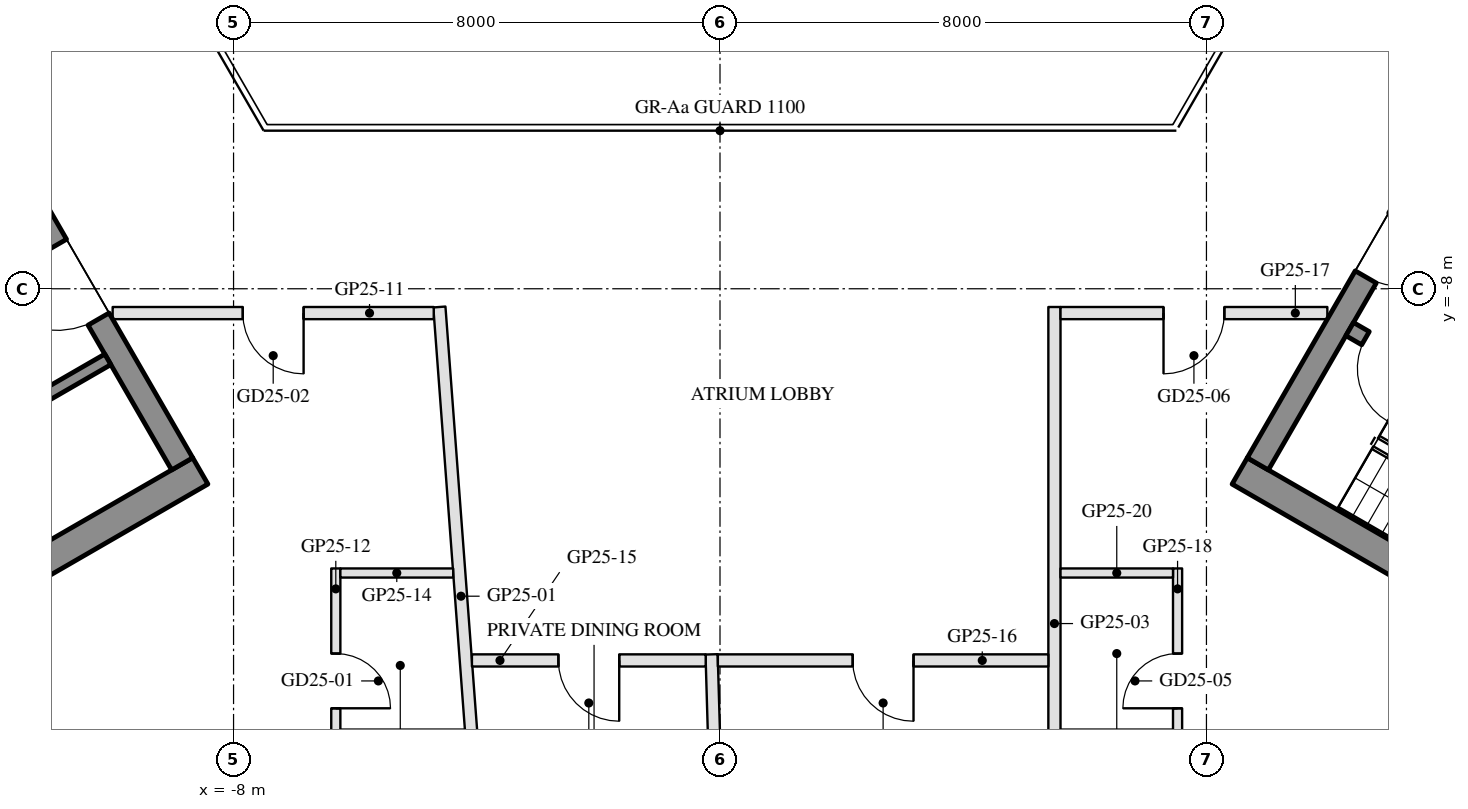
"""IFC4 building model, lengths in metres.
Left out: names, types, materials, properties, quantities, classifications, styles, units other than length and angle.
Written with IfcOpenShell. Run it as: python <this file> out.ifc"""

import sys

from ifc_helpers import new_model, si_unit, direction, frame, frame_2d, origin, place, context, subcontext, project, spatial, rectangle, extrude, element, fill, save


model = new_model("IFC4")
c1 = context("Model", 3, precision=1e-05, world=origin(), true_north=direction((0.0, 1.0)))
c2 = subcontext(c1, "Body", "Model", "MODEL_VIEW")
j1 = project(units=[si_unit("LENGTHUNIT", "METRE"), si_unit("PLANEANGLEUNIT", "RADIAN")], contexts=[c1])
p1 = place(None, origin())
s1 = spatial("IfcSite", under=j1, at=p1, CompositionType="ELEMENT")
p2 = place(p1, origin())
s2 = spatial("IfcBuilding", under=s1, at=p2, CompositionType="ELEMENT")
p3 = place(p2, frame((0.0, 0.0, 261.5)))
s3 = spatial("IfcBuildingStorey", under=s2, at=p3, CompositionType="ELEMENT", Elevation=261.5)
p4 = place(p3, frame((-8.547, -10.997, 0.0), z_axis=(0.0, 0.0, 1.0), x_axis=(-0.86602744543, -0.49999646375, 0.0)))
e1 = element("IfcWall", 1, at=p4, inside=s3, PredefinedType="SHEAR", context=c2, shape_type="SweptSolid", body=[
    extrude(rectangle(XDim=13.934, YDim=0.5, at=frame_2d((6.967, 0.0))), origin(), (0.0, 0.0, 1.0), 3.5),
])
p5 = place(p3, frame((-13.845, -2.22, 0.0), z_axis=(0.0, 0.0, 1.0), x_axis=(0.500004234368, -0.866022959057, 0.0)))
e2 = element("IfcWall", 2, at=p5, inside=s3, PredefinedType="SHEAR", context=c2, shape_type="SweptSolid", body=[
    extrude(rectangle(XDim=10.0, YDim=0.4, at=frame_2d((5.0, 0.0))), origin(), (0.0, 0.0, 1.0), 3.5),
])
p6 = place(p5, frame((3.55, 0.0, 0.0)))
e3 = element("IfcOpeningElement", 3, at=p6, cuts=e2, PredefinedType="OPENING", context=c2, shape_type="SweptSolid", body=[
    extrude(rectangle(XDim=1.1, YDim=2.1, at=frame_2d((0.55, 1.05))), frame((0.0, 0.21, 0.0), z_axis=(0.0, -1.0, 0.0), x_axis=(1.0, 0.0, 0.0)), (0.0, 0.0, 1.0), 0.42),
])
p7 = place(p5, frame((5.85, 0.0, 0.0)))
e4 = element("IfcOpeningElement", 4, at=p7, cuts=e2, PredefinedType="OPENING", context=c2, shape_type="SweptSolid", body=[
    extrude(rectangle(XDim=1.4, YDim=2.1, at=frame_2d((0.7, 1.05))), frame((0.0, 0.21, 0.0), z_axis=(0.0, -1.0, 0.0), x_axis=(1.0, 0.0, 0.0)), (0.0, 0.0, 1.0), 0.42),
])
p8 = place(p3, frame((-10.068, -9.162, 0.0), z_axis=(0.0, 0.0, 1.0), x_axis=(-0.866032725843, -0.499987317609, 0.0)))
e5 = element("IfcWall", 5, at=p8, inside=s3, PredefinedType="SHEAR", context=c2, shape_type="SweptSolid", body=[
    extrude(rectangle(XDim=10.16, YDim=0.2, at=frame_2d((5.08, 0.0))), origin(), (0.0, 0.0, 1.0), 3.5),
])
p9 = place(p8, frame((4.53, 0.0, 0.0)))
e6 = element("IfcOpeningElement", 6, at=p9, cuts=e5, PredefinedType="OPENING", context=c2, shape_type="SweptSolid", body=[
    extrude(rectangle(XDim=0.9, YDim=2.1, at=frame_2d((0.45, 1.05))), frame((0.0, 0.11, 0.0), z_axis=(0.0, -1.0, 0.0), x_axis=(1.0, 0.0, 0.0)), (0.0, 0.0, 1.0), 0.22),
])
p10 = place(p3, frame((8.547, -10.997, 0.0), z_axis=(0.0, 0.0, 1.0), x_axis=(0.86602744543, -0.49999646375, 0.0)))
e7 = element("IfcWall", 7, at=p10, inside=s3, PredefinedType="SHEAR", context=c2, shape_type="SweptSolid", body=[
    extrude(rectangle(XDim=13.934, YDim=0.5, at=frame_2d((6.967, 0.0))), origin(), (0.0, 0.0, 1.0), 3.5),
])
p11 = place(p3, frame((8.845, -10.88, 0.0), z_axis=(0.0, 0.0, 1.0), x_axis=(0.500004234368, 0.866022959057, 0.0)))
e8 = element("IfcWall", 8, at=p11, inside=s3, PredefinedType="SHEAR", context=c2, shape_type="SweptSolid", body=[
    extrude(rectangle(XDim=10.0, YDim=0.4, at=frame_2d((5.0, 0.0))), origin(), (0.0, 0.0, 1.0), 3.5),
])
p12 = place(p11, frame((3.55, 0.0, 0.0)))
e9 = element("IfcOpeningElement", 9, at=p12, cuts=e8, PredefinedType="OPENING", context=c2, shape_type="SweptSolid", body=[
    extrude(rectangle(XDim=1.1, YDim=2.1, at=frame_2d((0.55, 1.05))), frame((0.0, 0.21, 0.0), z_axis=(0.0, -1.0, 0.0), x_axis=(1.0, 0.0, 0.0)), (0.0, 0.0, 1.0), 0.42),
])
p13 = place(p11, frame((5.85, 0.0, 0.0)))
e10 = element("IfcOpeningElement", 10, at=p13, cuts=e8, PredefinedType="OPENING", context=c2, shape_type="SweptSolid", body=[
    extrude(rectangle(XDim=1.4, YDim=2.1, at=frame_2d((0.7, 1.05))), frame((0.0, 0.21, 0.0), z_axis=(0.0, -1.0, 0.0), x_axis=(1.0, 0.0, 0.0)), (0.0, 0.0, 1.0), 0.42),
])
p14 = place(p3, frame((10.356, -8.664, 0.0), z_axis=(0.0, 0.0, 1.0), x_axis=(0.866028629588, -0.499994412703, 0.0)))
e11 = element("IfcWall", 11, at=p14, inside=s3, PredefinedType="SHEAR", context=c2, shape_type="SweptSolid", body=[
    extrude(rectangle(XDim=6.45, YDim=0.25, at=frame_2d((3.225, 0.0))), origin(), (0.0, 0.0, 1.0), 3.5),
])
p15 = place(p14, frame((0.3, 0.0, 0.0)))
e12 = element("IfcOpeningElement", 12, at=p15, cuts=e11, PredefinedType="OPENING", context=c2, shape_type="SweptSolid", body=[
    extrude(rectangle(XDim=1.0, YDim=2.1, at=frame_2d((0.5, 1.05))), frame((0.0, 0.135, 0.0), z_axis=(0.0, -1.0, 0.0), x_axis=(1.0, 0.0, 0.0)), (0.0, 0.0, 1.0), 0.27),
])
p16 = place(p3, frame((-3.903, -17.813, 0.0), z_axis=(0.0, 0.0, 1.0), x_axis=(-0.074602257677, 0.997213368918, 0.0)))
e13 = element("IfcWall", 13, at=p16, inside=s3, PredefinedType="PARTITIONING", context=c2, shape_type="SweptSolid", body=[
    extrude(rectangle(XDim=9.54, YDim=0.2, at=frame_2d((4.77, 0.0))), origin(), (0.0, 0.0, 1.0), 3.0),
])
p17 = place(p3, frame((-0.04, -17.338, 0.0), z_axis=(0.0, 0.0, 1.0), x_axis=(-0.029431403757, 0.999566802406, 0.0)))
e14 = element("IfcWall", 14, at=p17, inside=s3, PredefinedType="PARTITIONING", context=c2, shape_type="SweptSolid", body=[
    extrude(rectangle(XDim=3.326, YDim=0.2, at=frame_2d((1.663, 0.0))), origin(), (0.0, 0.0, 1.0), 3.0),
])
p18 = place(p3, frame((5.5, -18.713, 0.0), z_axis=(0.0, 0.0, 1.0), x_axis=(0.0, 1.0, 0.0)))
e15 = element("IfcWall", 15, at=p18, inside=s3, PredefinedType="PARTITIONING", context=c2, shape_type="SweptSolid", body=[
    extrude(rectangle(XDim=10.413, YDim=0.2, at=frame_2d((5.207, 0.0))), origin(), (0.0, 0.0, 1.0), 3.1),
])
p19 = place(p3, frame((-4.708, -8.4, 0.0), z_axis=(0.0, 0.0, 1.0), x_axis=(-1.0, 0.0, 0.0)))
e16 = element("IfcWall", 16, at=p19, inside=s3, PredefinedType="PARTITIONING", context=c2, shape_type="SweptSolid", body=[
    extrude(rectangle(XDim=5.281, YDim=0.2, at=frame_2d((2.64, 0.0))), origin(), (0.0, 0.0, 1.0), 3.0),
])
p20 = place(p19, frame((2.14, 0.0, 0.0)))
e17 = element("IfcOpeningElement", 17, at=p20, cuts=e16, PredefinedType="OPENING", context=c2, shape_type="SweptSolid", body=[
    extrude(rectangle(XDim=1.0, YDim=2.1, at=frame_2d((0.5, 1.05))), frame((0.0, 0.11, 0.0), z_axis=(0.0, -1.0, 0.0), x_axis=(1.0, 0.0, 0.0)), (0.0, 0.0, 1.0), 0.22),
])
p21 = place(p3, frame((-6.319, -12.6, 0.0), z_axis=(0.0, 0.0, 1.0), x_axis=(0.0, -1.0, 0.0)))
e18 = element("IfcWall", 18, at=p21, inside=s3, PredefinedType="PARTITIONING", context=c2, shape_type="SweptSolid", body=[
    extrude(rectangle(XDim=2.8, YDim=0.15, at=frame_2d((1.4, 0.0))), origin(), (0.0, 0.0, 1.0), 3.55),
])
p22 = place(p21, frame((1.4, 0.0, 0.0)))
e19 = element("IfcOpeningElement", 19, at=p22, cuts=e18, PredefinedType="OPENING", context=c2, shape_type="SweptSolid", body=[
    extrude(rectangle(XDim=0.9, YDim=2.1, at=frame_2d((0.45, 1.05))), frame((0.0, 0.085, 0.0), z_axis=(0.0, -1.0, 0.0), x_axis=(1.0, 0.0, 0.0)), (0.0, 0.0, 1.0), 0.17),
])
p23 = place(p3, frame((-6.243, -12.675, 0.0), z_axis=(0.0, 0.0, 1.0), x_axis=(1.0, 0.0, 0.0)))
e20 = element("IfcWall", 20, at=p23, inside=s3, PredefinedType="PARTITIONING", context=c2, shape_type="SweptSolid", body=[
    extrude(rectangle(XDim=1.855, YDim=0.15, at=frame_2d((0.928, 0.0))), origin(), (0.0, 0.0, 1.0), 3.55),
])
p24 = place(p3, frame((-0.235, -14.113, 0.0), z_axis=(0.0, 0.0, 1.0), x_axis=(-1.0, 0.0, 0.0)))
e21 = element("IfcWall", 21, at=p24, inside=s3, PredefinedType="PARTITIONING", context=c2, shape_type="SweptSolid", body=[
    extrude(rectangle(XDim=3.845, YDim=0.2, at=frame_2d((1.922, 0.0))), origin(), (0.0, 0.0, 1.0), 3.0),
])
p25 = place(p24, frame((1.422, 0.0, 0.0)))
e22 = element("IfcOpeningElement", 22, at=p25, cuts=e21, PredefinedType="OPENING", context=c2, shape_type="SweptSolid", body=[
    extrude(rectangle(XDim=1.0, YDim=2.1, at=frame_2d((0.5, 1.05))), frame((0.0, 0.11, 0.0), z_axis=(0.0, -1.0, 0.0), x_axis=(1.0, 0.0, 0.0)), (0.0, 0.0, 1.0), 0.22),
])
p26 = place(p3, frame((5.4, -14.113, 0.0), z_axis=(0.0, 0.0, 1.0), x_axis=(-1.0, 0.0, 0.0)))
e23 = element("IfcWall", 23, at=p26, inside=s3, PredefinedType="PARTITIONING", context=c2, shape_type="SweptSolid", body=[
    extrude(rectangle(XDim=5.435, YDim=0.2, at=frame_2d((2.718, 0.0))), origin(), (0.0, 0.0, 1.0), 3.0),
])
p27 = place(p26, frame((2.218, 0.0, 0.0)))
e24 = element("IfcOpeningElement", 24, at=p27, cuts=e23, PredefinedType="OPENING", context=c2, shape_type="SweptSolid", body=[
    extrude(rectangle(XDim=1.0, YDim=2.1, at=frame_2d((0.5, 1.05))), frame((0.0, 0.11, 0.0), z_axis=(0.0, -1.0, 0.0), x_axis=(1.0, 0.0, 0.0)), (0.0, 0.0, 1.0), 0.22),
])
p28 = place(p3, frame((9.988, -8.4, 0.0), z_axis=(0.0, 0.0, 1.0), x_axis=(-1.0, 0.0, 0.0)))
e25 = element("IfcWall", 25, at=p28, inside=s3, PredefinedType="PARTITIONING", context=c2, shape_type="SweptSolid", body=[
    extrude(rectangle(XDim=4.388, YDim=0.2, at=frame_2d((2.194, 0.0))), origin(), (0.0, 0.0, 1.0), 3.0),
])
p29 = place(p28, frame((1.694, 0.0, 0.0)))
e26 = element("IfcOpeningElement", 26, at=p29, cuts=e25, PredefinedType="OPENING", context=c2, shape_type="SweptSolid", body=[
    extrude(rectangle(XDim=1.0, YDim=2.1, at=frame_2d((0.5, 1.05))), frame((0.0, 0.11, 0.0), z_axis=(0.0, -1.0, 0.0), x_axis=(1.0, 0.0, 0.0)), (0.0, 0.0, 1.0), 0.22),
])
p30 = place(p3, frame((7.525, -15.4, 0.0), z_axis=(0.0, 0.0, 1.0), x_axis=(0.0, 1.0, 0.0)))
e27 = element("IfcWall", 27, at=p30, inside=s3, PredefinedType="PARTITIONING", context=c2, shape_type="SweptSolid", body=[
    extrude(rectangle(XDim=2.8, YDim=0.15, at=frame_2d((1.4, 0.0))), origin(), (0.0, 0.0, 1.0), 3.0),
])
p31 = place(p30, frame((0.5, 0.0, 0.0)))
e28 = element("IfcOpeningElement", 28, at=p31, cuts=e27, PredefinedType="OPENING", context=c2, shape_type="SweptSolid", body=[
    extrude(rectangle(XDim=0.9, YDim=2.1, at=frame_2d((0.45, 1.05))), frame((0.0, 0.085, 0.0), z_axis=(0.0, -1.0, 0.0), x_axis=(1.0, 0.0, 0.0)), (0.0, 0.0, 1.0), 0.17),
])
p32 = place(p3, frame((5.6, -12.675, 0.0), z_axis=(0.0, 0.0, 1.0), x_axis=(1.0, 0.0, 0.0)))
e29 = element("IfcWall", 29, at=p32, inside=s3, PredefinedType="PARTITIONING", context=c2, shape_type="SweptSolid", body=[
    extrude(rectangle(XDim=1.85, YDim=0.15, at=frame_2d((0.925, 0.0))), origin(), (0.0, 0.0, 1.0), 3.55),
])
p33 = place(p3, frame((10.378, -1.175, 0.0), z_axis=(0.0, 0.0, 1.0), x_axis=(0.50004096614, -0.86600175068, 0.0)))
e30 = element("IfcWall", 30, at=p33, inside=s3, PredefinedType="PARTITIONING", context=c2, shape_type="SweptSolid", body=[
    extrude(rectangle(XDim=3.782, YDim=0.2, at=frame_2d((1.891, 0.0))), origin(), (0.0, 0.0, 1.0), 3.0),
])
p34 = place(p33, frame((1.391, 0.0, 0.0)))
e31 = element("IfcOpeningElement", 31, at=p34, cuts=e30, PredefinedType="OPENING", context=c2, shape_type="SweptSolid", body=[
    extrude(rectangle(XDim=1.0, YDim=2.1, at=frame_2d((0.5, 1.05))), frame((0.0, 0.11, 0.0), z_axis=(0.0, -1.0, 0.0), x_axis=(1.0, 0.0, 0.0)), (0.0, 0.0, 1.0), 0.22),
])
p35 = place(p3, frame((-12.269, -4.45, 0.0), z_axis=(0.0, 0.0, 1.0), x_axis=(0.500009958894, 0.866019653938, 0.0)))
e32 = element("IfcWall", 32, at=p35, inside=s3, PredefinedType="PARTITIONING", context=c2, shape_type="SweptSolid", body=[
    extrude(rectangle(XDim=5.685, YDim=0.2, at=frame_2d((2.842, 0.0))), origin(), (0.0, 0.0, 1.0), 3.0),
])
p36 = place(p35, frame((2.342, 0.0, 0.0)))
e33 = element("IfcOpeningElement", 33, at=p36, cuts=e32, PredefinedType="OPENING", context=c2, shape_type="SweptSolid", body=[
    extrude(rectangle(XDim=1.0, YDim=2.1, at=frame_2d((0.5, 1.05))), frame((0.0, 0.11, 0.0), z_axis=(0.0, -1.0, 0.0), x_axis=(1.0, 0.0, 0.0)), (0.0, 0.0, 1.0), 0.22),
])
p37 = place(p7, frame((1.4, 0.0, 0.0), z_axis=(0.0, 0.0, 1.0), x_axis=(-1.0, 0.0, 0.0)))
e34 = element("IfcDoor", 34, at=p37, inside=s3, OperationType="DOUBLE_DOOR_SINGLE_SWING", PredefinedType="DOOR", context=c2, shape_type="SweptSolid", body=[
    extrude(rectangle(XDim=1.4, YDim=2.1, at=frame_2d((0.7, 1.05))), frame((0.0, 0.025, 0.0), z_axis=(0.0, -1.0, 0.0), x_axis=(1.0, 0.0, 0.0)), (0.0, 0.0, 1.0), 0.05),
])
fill(e4, e34)
p38 = place(p12, frame((1.1, 0.0, 0.0), z_axis=(0.0, 0.0, 1.0), x_axis=(-1.0, 0.0, 0.0)))
e35 = element("IfcDoor", 35, at=p38, inside=s3, OperationType="SINGLE_SWING_LEFT", PredefinedType="DOOR", context=c2, shape_type="SweptSolid", body=[
    extrude(rectangle(XDim=1.1, YDim=2.1, at=frame_2d((0.55, 1.05))), frame((0.0, 0.025, 0.0), z_axis=(0.0, -1.0, 0.0), x_axis=(1.0, 0.0, 0.0)), (0.0, 0.0, 1.0), 0.05),
])
fill(e9, e35)
p39 = place(p15, frame((1.0, 0.0, 0.0), z_axis=(0.0, 0.0, 1.0), x_axis=(-1.0, 0.0, 0.0)))
e36 = element("IfcDoor", 36, at=p39, inside=s3, OperationType="SINGLE_SWING_LEFT", PredefinedType="DOOR", context=c2, shape_type="SweptSolid", body=[
    extrude(rectangle(XDim=1.0, YDim=2.1, at=frame_2d((0.5, 1.05))), frame((0.0, 0.025, 0.0), z_axis=(0.0, -1.0, 0.0), x_axis=(1.0, 0.0, 0.0)), (0.0, 0.0, 1.0), 0.05),
])
fill(e12, e36)
p40 = place(p22, origin())
e37 = element("IfcDoor", 37, at=p40, inside=s3, OperationType="SINGLE_SWING_RIGHT", PredefinedType="DOOR", context=c2, shape_type="SweptSolid", body=[
    extrude(rectangle(XDim=0.9, YDim=2.1, at=frame_2d((0.45, 1.05))), frame((0.0, 0.025, 0.0), z_axis=(0.0, -1.0, 0.0), x_axis=(1.0, 0.0, 0.0)), (0.0, 0.0, 1.0), 0.05),
])
fill(e19, e37)
p41 = place(p20, origin())
e38 = element("IfcDoor", 38, at=p41, inside=s3, OperationType="SINGLE_SWING_LEFT", PredefinedType="DOOR", context=c2, shape_type="SweptSolid", body=[
    extrude(rectangle(XDim=1.0, YDim=2.1, at=frame_2d((0.5, 1.05))), frame((0.0, 0.025, 0.0), z_axis=(0.0, -1.0, 0.0), x_axis=(1.0, 0.0, 0.0)), (0.0, 0.0, 1.0), 0.05),
])
fill(e17, e38)
p42 = place(p25, origin())
e39 = element("IfcDoor", 39, at=p42, inside=s3, OperationType="SINGLE_SWING_LEFT", PredefinedType="DOOR", context=c2, shape_type="SweptSolid", body=[
    extrude(rectangle(XDim=1.0, YDim=2.1, at=frame_2d((0.5, 1.05))), frame((0.0, 0.025, 0.0), z_axis=(0.0, -1.0, 0.0), x_axis=(1.0, 0.0, 0.0)), (0.0, 0.0, 1.0), 0.05),
])
fill(e22, e39)
p43 = place(p27, origin())
e40 = element("IfcDoor", 40, at=p43, inside=s3, OperationType="SINGLE_SWING_LEFT", PredefinedType="DOOR", context=c2, shape_type="SweptSolid", body=[
    extrude(rectangle(XDim=1.0, YDim=2.1, at=frame_2d((0.5, 1.05))), frame((0.0, 0.025, 0.0), z_axis=(0.0, -1.0, 0.0), x_axis=(1.0, 0.0, 0.0)), (0.0, 0.0, 1.0), 0.05),
])
fill(e24, e40)
p44 = place(p31, origin())
e41 = element("IfcDoor", 41, at=p44, inside=s3, OperationType="SINGLE_SWING_LEFT", PredefinedType="DOOR", context=c2, shape_type="SweptSolid", body=[
    extrude(rectangle(XDim=0.9, YDim=2.1, at=frame_2d((0.45, 1.05))), frame((0.0, 0.025, 0.0), z_axis=(0.0, -1.0, 0.0), x_axis=(1.0, 0.0, 0.0)), (0.0, 0.0, 1.0), 0.05),
])
fill(e28, e41)
p45 = place(p29, origin())
e42 = element("IfcDoor", 42, at=p45, inside=s3, OperationType="SINGLE_SWING_RIGHT", PredefinedType="DOOR", context=c2, shape_type="SweptSolid", body=[
    extrude(rectangle(XDim=1.0, YDim=2.1, at=frame_2d((0.5, 1.05))), frame((0.0, 0.025, 0.0), z_axis=(0.0, -1.0, 0.0), x_axis=(1.0, 0.0, 0.0)), (0.0, 0.0, 1.0), 0.05),
])
fill(e26, e42)
save(model, sys.argv[1])
